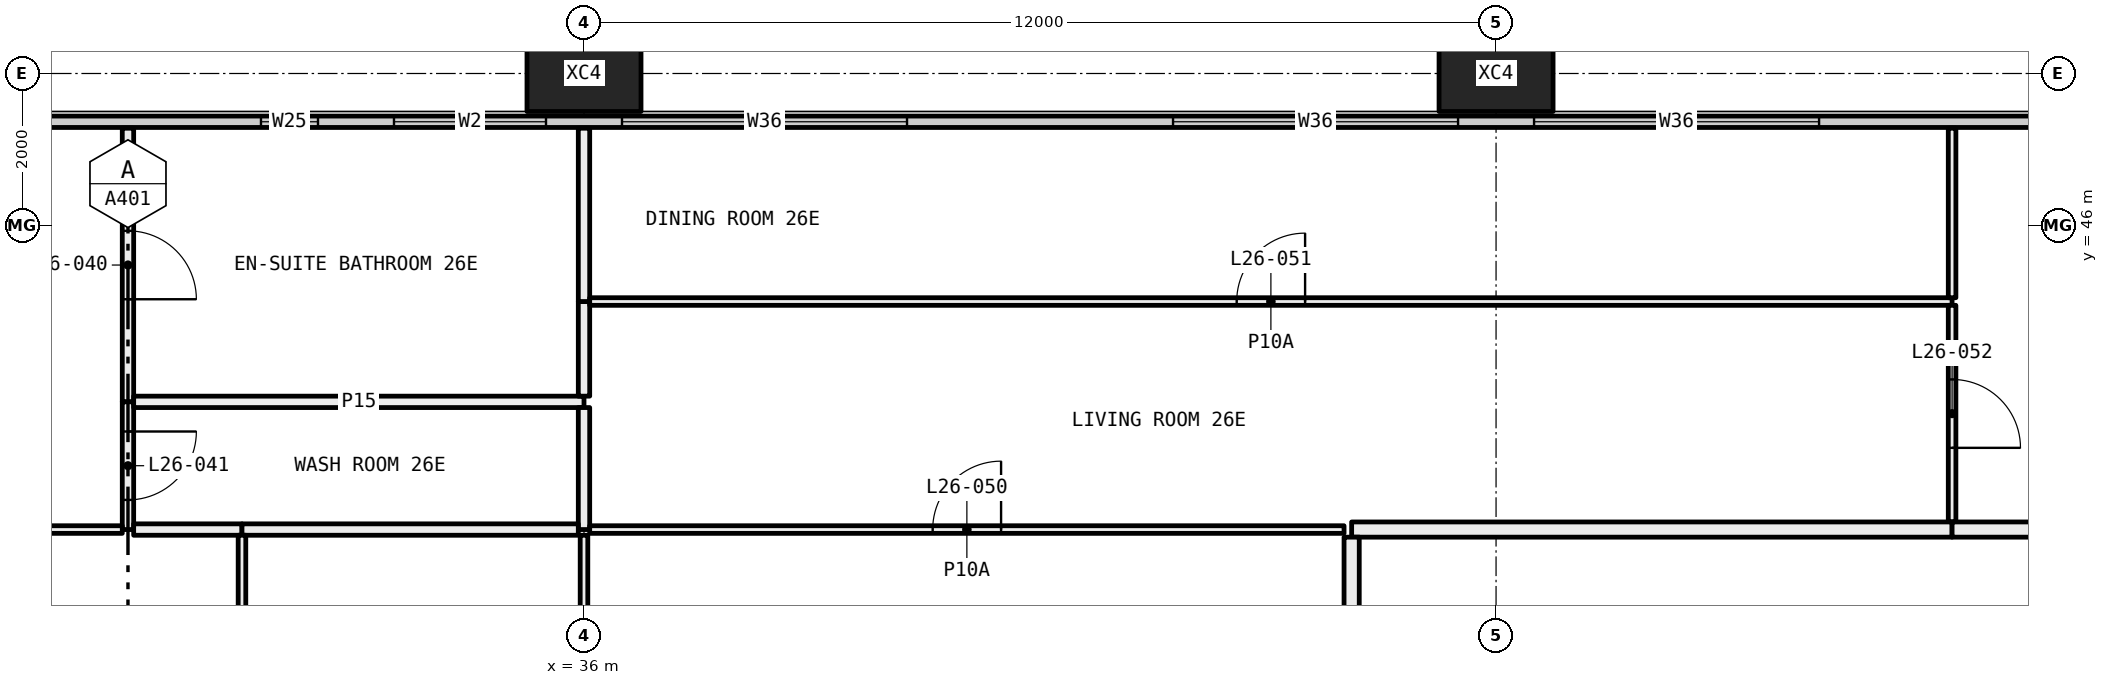
"""IFC4 building model, lengths in metres.
Left out: names, types, materials, properties, quantities, classifications, styles, units other than length and angle.
Written with IfcOpenShell. Run it as: python <this file> out.ifc"""

import sys

from ifc_helpers import new_model, si_unit, direction, frame, frame_2d, origin, origin_2d, place, context, subcontext, project, spatial, rectangle, hollow_rectangle, extrude, element, fill, save


model = new_model("IFC4")
c1 = context("Model", 3, precision=1e-05, world=origin(), true_north=direction((0.0, 1.0)))
c2 = subcontext(c1, "Body", "Model", "MODEL_VIEW")
j1 = project(units=[si_unit("LENGTHUNIT", "METRE"), si_unit("PLANEANGLEUNIT", "RADIAN")], contexts=[c1])
p1 = place(None, origin())
s1 = spatial("IfcSite", under=j1, at=p1, CompositionType="ELEMENT")
p2 = place(p1, origin())
s2 = spatial("IfcBuilding", under=s1, at=p2, CompositionType="ELEMENT")
p3 = place(p2, frame((0.0, 0.0, 103.5)))
s3 = spatial("IfcBuildingStorey", under=s2, at=p3, CompositionType="ELEMENT", Elevation=103.5)
for number, where, z_axis, x_axis in (
    (1, (36.0, 48.0, -0.4), (0.0, 0.0, 1.0), (1.0, 0.0, 0.0)),
    (2, (48.0, 48.0, -0.4), (0.0, 0.0, 1.0), (1.0, 0.0, 0.0)),
):
    element("IfcColumn", number, at=place(p3, frame(where, z_axis=z_axis, x_axis=x_axis)), inside=s3, PredefinedType="COLUMN", context=c2, shape_type="SweptSolid", body=[
        extrude(hollow_rectangle(XDim=1.5, YDim=1.0, WallThickness=0.06, at=origin_2d()), origin(), (0.0, 0.0, 1.0), 3.45),
    ])
p4 = place(p3, frame((6.56, 47.365, 0.0), z_axis=(0.0, 0.0, 1.0), x_axis=(1.0, 0.0, 0.0)))
e3 = element("IfcWall", 3, at=p4, inside=s3, PredefinedType="ELEMENTEDWALL", context=c2, shape_type="SweptSolid", body=[
    extrude(rectangle(XDim=58.88, YDim=0.15, at=frame_2d((29.44, 0.0))), origin(), (0.0, 0.0, 1.0), 3.05),
])
p5 = place(p4, frame((0.44, 0.0, 0.45)))
e4 = element("IfcOpeningElement", 4, at=p5, cuts=e3, PredefinedType="OPENING", context=c2, shape_type="SweptSolid", body=[
    extrude(rectangle(XDim=4.5, YDim=2.55, at=frame_2d((2.25, 1.275))), frame((0.0, 0.085, 0.0), z_axis=(0.0, -1.0, 0.0), x_axis=(1.0, 0.0, 0.0)), (0.0, 0.0, 1.0), 0.17),
])
p6 = place(p4, frame((5.94, 0.0, 0.45)))
e5 = element("IfcOpeningElement", 5, at=p6, cuts=e3, PredefinedType="OPENING", context=c2, shape_type="SweptSolid", body=[
    extrude(rectangle(XDim=3.75, YDim=2.55, at=frame_2d((1.875, 1.275))), frame((0.0, 0.085, 0.0), z_axis=(0.0, -1.0, 0.0), x_axis=(1.0, 0.0, 0.0)), (0.0, 0.0, 1.0), 0.17),
])
p7 = place(p4, frame((13.19, 0.0, 0.45)))
e6 = element("IfcOpeningElement", 6, at=p7, cuts=e3, PredefinedType="OPENING", context=c2, shape_type="SweptSolid", body=[
    extrude(rectangle(XDim=3.75, YDim=2.55, at=frame_2d((1.875, 1.275))), frame((0.0, 0.085, 0.0), z_axis=(0.0, -1.0, 0.0), x_axis=(1.0, 0.0, 0.0)), (0.0, 0.0, 1.0), 0.17),
])
p8 = place(p4, frame((17.94, 0.0, 0.45)))
e7 = element("IfcOpeningElement", 7, at=p8, cuts=e3, PredefinedType="OPENING", context=c2, shape_type="SweptSolid", body=[
    extrude(rectangle(XDim=3.75, YDim=2.55, at=frame_2d((1.875, 1.275))), frame((0.0, 0.085, 0.0), z_axis=(0.0, -1.0, 0.0), x_axis=(1.0, 0.0, 0.0)), (0.0, 0.0, 1.0), 0.17),
])
p9 = place(p4, frame((25.19, 0.0, 0.45)))
e8 = element("IfcOpeningElement", 8, at=p9, cuts=e3, PredefinedType="OPENING", context=c2, shape_type="SweptSolid", body=[
    extrude(rectangle(XDim=0.75, YDim=2.55, at=frame_2d((0.375, 1.275))), frame((0.0, 0.085, 0.0), z_axis=(0.0, -1.0, 0.0), x_axis=(1.0, 0.0, 0.0)), (0.0, 0.0, 1.0), 0.17),
])
p10 = place(p4, frame((26.94, 0.0, 0.45)))
e9 = element("IfcOpeningElement", 9, at=p10, cuts=e3, PredefinedType="OPENING", context=c2, shape_type="SweptSolid", body=[
    extrude(rectangle(XDim=2.0, YDim=2.55, at=frame_2d((1.0, 1.275))), frame((0.0, 0.085, 0.0), z_axis=(0.0, -1.0, 0.0), x_axis=(1.0, 0.0, 0.0)), (0.0, 0.0, 1.0), 0.17),
])
p11 = place(p4, frame((29.94, 0.0, 0.45)))
e10 = element("IfcOpeningElement", 10, at=p11, cuts=e3, PredefinedType="OPENING", context=c2, shape_type="SweptSolid", body=[
    extrude(rectangle(XDim=3.75, YDim=2.55, at=frame_2d((1.875, 1.275))), frame((0.0, 0.085, 0.0), z_axis=(0.0, -1.0, 0.0), x_axis=(1.0, 0.0, 0.0)), (0.0, 0.0, 1.0), 0.17),
])
p12 = place(p4, frame((37.19, 0.0, 0.45)))
e11 = element("IfcOpeningElement", 11, at=p12, cuts=e3, PredefinedType="OPENING", context=c2, shape_type="SweptSolid", body=[
    extrude(rectangle(XDim=3.75, YDim=2.55, at=frame_2d((1.875, 1.275))), frame((0.0, 0.085, 0.0), z_axis=(0.0, -1.0, 0.0), x_axis=(1.0, 0.0, 0.0)), (0.0, 0.0, 1.0), 0.17),
])
p13 = place(p4, frame((41.94, 0.0, 0.45)))
e12 = element("IfcOpeningElement", 12, at=p13, cuts=e3, PredefinedType="OPENING", context=c2, shape_type="SweptSolid", body=[
    extrude(rectangle(XDim=3.75, YDim=2.55, at=frame_2d((1.875, 1.275))), frame((0.0, 0.085, 0.0), z_axis=(0.0, -1.0, 0.0), x_axis=(1.0, 0.0, 0.0)), (0.0, 0.0, 1.0), 0.17),
])
p14 = place(p4, frame((49.19, 0.0, 0.45)))
e13 = element("IfcOpeningElement", 13, at=p14, cuts=e3, PredefinedType="OPENING", context=c2, shape_type="SweptSolid", body=[
    extrude(rectangle(XDim=0.75, YDim=2.55, at=frame_2d((0.375, 1.275))), frame((0.0, 0.085, 0.0), z_axis=(0.0, -1.0, 0.0), x_axis=(1.0, 0.0, 0.0)), (0.0, 0.0, 1.0), 0.17),
])
p15 = place(p4, frame((50.94, 0.0, 0.45)))
e14 = element("IfcOpeningElement", 14, at=p15, cuts=e3, PredefinedType="OPENING", context=c2, shape_type="SweptSolid", body=[
    extrude(rectangle(XDim=2.0, YDim=2.55, at=frame_2d((1.0, 1.275))), frame((0.0, 0.085, 0.0), z_axis=(0.0, -1.0, 0.0), x_axis=(1.0, 0.0, 0.0)), (0.0, 0.0, 1.0), 0.17),
])
p16 = place(p4, frame((53.94, 0.0, 0.45)))
e15 = element("IfcOpeningElement", 15, at=p16, cuts=e3, PredefinedType="OPENING", context=c2, shape_type="SweptSolid", body=[
    extrude(rectangle(XDim=4.5, YDim=2.55, at=frame_2d((2.25, 1.275))), frame((0.0, 0.085, 0.0), z_axis=(0.0, -1.0, 0.0), x_axis=(1.0, 0.0, 0.0)), (0.0, 0.0, 1.0), 0.17),
])
p17 = place(p3, frame((30.0, 43.68, 0.0), z_axis=(0.0, 0.0, 1.0), x_axis=(0.0, 1.0, 0.0)))
e16 = element("IfcWall", 16, at=p17, inside=s3, PredefinedType="PARTITIONING", context=c2, shape_type="SweptSolid", body=[
    extrude(rectangle(XDim=3.6, YDim=0.15, at=frame_2d((1.8, 0.0))), origin(), (0.0, 0.0, 1.0), 3.05),
])
p18 = place(p17, frame((1.35, 0.0, 0.0)))
e17 = element("IfcOpeningElement", 17, at=p18, cuts=e16, PredefinedType="OPENING", context=c2, shape_type="SweptSolid", body=[
    extrude(rectangle(XDim=0.9, YDim=2.1, at=frame_2d((0.45, 1.05))), frame((0.0, 0.085, 0.0), z_axis=(0.0, -1.0, 0.0), x_axis=(1.0, 0.0, 0.0)), (0.0, 0.0, 1.0), 0.17),
])
p19 = place(p3, frame((30.0, 42.0, 0.0), z_axis=(0.0, 0.0, 1.0), x_axis=(0.0, 1.0, 0.0)))
e18 = element("IfcWall", 18, at=p19, inside=s3, PredefinedType="PARTITIONING", context=c2, shape_type="SweptSolid", body=[
    extrude(rectangle(XDim=1.68, YDim=0.15, at=frame_2d((0.84, 0.0))), origin(), (0.0, 0.0, 1.0), 3.05),
])
p20 = place(p19, frame((0.39, 0.0, 0.0)))
e19 = element("IfcOpeningElement", 19, at=p20, cuts=e18, PredefinedType="OPENING", context=c2, shape_type="SweptSolid", body=[
    extrude(rectangle(XDim=0.9, YDim=2.1, at=frame_2d((0.45, 1.05))), frame((0.0, 0.085, 0.0), z_axis=(0.0, -1.0, 0.0), x_axis=(1.0, 0.0, 0.0)), (0.0, 0.0, 1.0), 0.17),
])
p21 = place(p3, frame((26.0, 42.0, 0.0), z_axis=(0.0, 0.0, 1.0), x_axis=(1.0, 0.0, 0.0)))
e20 = element("IfcWall", 20, at=p21, inside=s3, PredefinedType="PARTITIONING", context=c2, shape_type="SweptSolid", body=[
    extrude(rectangle(XDim=3.925, YDim=0.1, at=frame_2d((1.962, 0.0))), origin(), (0.0, 0.0, 1.0), 3.05),
])
p22 = place(p21, frame((1.512, 0.0, 0.0)))
e21 = element("IfcOpeningElement", 21, at=p22, cuts=e20, PredefinedType="OPENING", context=c2, shape_type="SweptSolid", body=[
    extrude(rectangle(XDim=0.9, YDim=2.1, at=frame_2d((0.45, 1.05))), frame((0.0, 0.06, 0.0), z_axis=(0.0, -1.0, 0.0), x_axis=(1.0, 0.0, 0.0)), (0.0, 0.0, 1.0), 0.12),
])
p23 = place(p3, frame((30.075, 43.68, 0.0), z_axis=(0.0, 0.0, 1.0), x_axis=(1.0, 0.0, 0.0)))
e22 = element("IfcWall", 22, at=p23, inside=s3, PredefinedType="PARTITIONING", context=c2, shape_type="SweptSolid", body=[
    extrude(rectangle(XDim=5.925, YDim=0.15, at=frame_2d((2.962, 0.0))), origin(), (0.0, 0.0, 1.0), 2.45),
])
p24 = place(p3, frame((36.0, 43.755, 0.0), z_axis=(0.0, 0.0, 1.0), x_axis=(0.0, 1.0, 0.0)))
e23 = element("IfcWall", 23, at=p24, inside=s3, PredefinedType="PARTITIONING", context=c2, shape_type="SweptSolid", body=[
    extrude(rectangle(XDim=1.245, YDim=0.15, at=frame_2d((0.623, 0.0))), origin(), (0.0, 0.0, 1.0), 2.45),
])
p25 = place(p3, frame((36.0, 45.0, 0.0), z_axis=(0.0, 0.0, 1.0), x_axis=(0.0, 1.0, 0.0)))
e24 = element("IfcWall", 24, at=p25, inside=s3, PredefinedType="PARTITIONING", context=c2, shape_type="SweptSolid", body=[
    extrude(rectangle(XDim=2.28, YDim=0.15, at=frame_2d((1.14, 0.0))), origin(), (0.0, 0.0, 1.0), 2.45),
])
p26 = place(p3, frame((36.0, 42.0, 0.0), z_axis=(0.0, 0.0, 1.0), x_axis=(0.0, 1.0, 0.0)))
e25 = element("IfcWall", 25, at=p26, inside=s3, PredefinedType="PARTITIONING", context=c2, shape_type="SweptSolid", body=[
    extrude(rectangle(XDim=1.605, YDim=0.15, at=frame_2d((0.802, 0.0))), origin(), (0.0, 0.0, 1.0), 2.45),
])
p27 = place(p3, frame((30.075, 42.0, 0.0), z_axis=(0.0, 0.0, 1.0), x_axis=(1.0, 0.0, 0.0)))
e26 = element("IfcWall", 26, at=p27, inside=s3, PredefinedType="PARTITIONING", context=c2, shape_type="SweptSolid", body=[
    extrude(rectangle(XDim=1.425, YDim=0.15, at=frame_2d((0.712, 0.0))), origin(), (0.0, 0.0, 1.0), 3.05),
])
p28 = place(p3, frame((31.5, 42.0, 0.0), z_axis=(0.0, 0.0, 1.0), x_axis=(1.0, 0.0, 0.0)))
e27 = element("IfcWall", 27, at=p28, inside=s3, PredefinedType="PARTITIONING", context=c2, shape_type="SweptSolid", body=[
    extrude(rectangle(XDim=4.425, YDim=0.15, at=frame_2d((2.212, 0.0))), origin(), (0.0, 0.0, 1.0), 2.45),
])
p29 = place(p3, frame((54.0, 45.0, 0.0), z_axis=(0.0, 0.0, 1.0), x_axis=(-1.0, 0.0, 0.0)))
e28 = element("IfcWall", 28, at=p29, inside=s3, PredefinedType="PARTITIONING", context=c2, shape_type="SweptSolid", body=[
    extrude(rectangle(XDim=17.925, YDim=0.1, at=frame_2d((8.962, 0.0))), origin(), (0.0, 0.0, 1.0), 2.45),
])
p30 = place(p29, frame((8.512, 0.0, 0.0)))
e29 = element("IfcOpeningElement", 29, at=p30, cuts=e28, PredefinedType="OPENING", context=c2, shape_type="SweptSolid", body=[
    extrude(rectangle(XDim=0.9, YDim=2.1, at=frame_2d((0.45, 1.05))), frame((0.0, 0.06, 0.0), z_axis=(0.0, -1.0, 0.0), x_axis=(1.0, 0.0, 0.0)), (0.0, 0.0, 1.0), 0.12),
])
p31 = place(p3, frame((54.0, 42.1, 0.0), z_axis=(0.0, 0.0, 1.0), x_axis=(0.0, 1.0, 0.0)))
e30 = element("IfcWall", 30, at=p31, inside=s3, PredefinedType="PARTITIONING", context=c2, shape_type="SweptSolid", body=[
    extrude(rectangle(XDim=2.85, YDim=0.1, at=frame_2d((1.425, 0.0))), origin(), (0.0, 0.0, 1.0), 3.05),
])
p32 = place(p31, frame((0.975, 0.0, 0.0)))
e31 = element("IfcOpeningElement", 31, at=p32, cuts=e30, PredefinedType="OPENING", context=c2, shape_type="SweptSolid", body=[
    extrude(rectangle(XDim=0.9, YDim=2.1, at=frame_2d((0.45, 1.05))), frame((0.0, 0.06, 0.0), z_axis=(0.0, -1.0, 0.0), x_axis=(1.0, 0.0, 0.0)), (0.0, 0.0, 1.0), 0.12),
])
p33 = place(p3, frame((36.075, 42.0, 0.0), z_axis=(0.0, 0.0, 1.0), x_axis=(1.0, 0.0, 0.0)))
e32 = element("IfcWall", 32, at=p33, inside=s3, PredefinedType="PARTITIONING", context=c2, shape_type="SweptSolid", body=[
    extrude(rectangle(XDim=9.925, YDim=0.1, at=frame_2d((4.962, 0.0))), origin(), (0.0, 0.0, 1.0), 2.45),
])
p34 = place(p33, frame((4.512, 0.0, 0.0)))
e33 = element("IfcOpeningElement", 33, at=p34, cuts=e32, PredefinedType="OPENING", context=c2, shape_type="SweptSolid", body=[
    extrude(rectangle(XDim=0.9, YDim=2.1, at=frame_2d((0.45, 1.05))), frame((0.0, 0.06, 0.0), z_axis=(0.0, -1.0, 0.0), x_axis=(1.0, 0.0, 0.0)), (0.0, 0.0, 1.0), 0.12),
])
p35 = place(p3, frame((46.1, 42.0, 0.0), z_axis=(0.0, 0.0, 1.0), x_axis=(1.0, 0.0, 0.0)))
e34 = element("IfcWall", 34, at=p35, inside=s3, PredefinedType="PARTITIONING", context=c2, shape_type="SweptSolid", body=[
    extrude(rectangle(XDim=7.9, YDim=0.2, at=frame_2d((3.95, 0.0))), origin(), (0.0, 0.0, 1.0), 3.05),
])
p36 = place(p3, frame((54.0, 45.05, 0.0), z_axis=(0.0, 0.0, 1.0), x_axis=(0.0, 1.0, 0.0)))
e35 = element("IfcWall", 35, at=p36, inside=s3, PredefinedType="PARTITIONING", context=c2, shape_type="SweptSolid", body=[
    extrude(rectangle(XDim=2.23, YDim=0.1, at=frame_2d((1.115, 0.0))), origin(), (0.0, 0.0, 1.0), 3.05),
])
p37 = place(p3, frame((54.0, 42.0, 0.0), z_axis=(0.0, 0.0, 1.0), x_axis=(1.0, 0.0, 0.0)))
e36 = element("IfcWall", 36, at=p37, inside=s3, PredefinedType="PARTITIONING", context=c2, shape_type="SweptSolid", body=[
    extrude(rectangle(XDim=6.0, YDim=0.2, at=frame_2d((3.0, 0.0))), origin(), (0.0, 0.0, 1.0), 3.05),
])
p38 = place(p3, frame((31.5, 36.1, 0.0), z_axis=(0.0, 0.0, 1.0), x_axis=(0.0, 1.0, 0.0)))
e37 = element("IfcWall", 37, at=p38, inside=s3, PredefinedType="PARTITIONING", context=c2, shape_type="SweptSolid", body=[
    extrude(rectangle(XDim=5.825, YDim=0.1, at=frame_2d((2.913, 0.0))), origin(), (0.0, 0.0, 1.0), 3.05),
])
p39 = place(p38, frame((2.462, 0.0, 0.0)))
e38 = element("IfcOpeningElement", 38, at=p39, cuts=e37, PredefinedType="OPENING", context=c2, shape_type="SweptSolid", body=[
    extrude(rectangle(XDim=0.9, YDim=2.1, at=frame_2d((0.45, 1.05))), frame((0.0, 0.06, 0.0), z_axis=(0.0, -1.0, 0.0), x_axis=(1.0, 0.0, 0.0)), (0.0, 0.0, 1.0), 0.12),
])
p40 = place(p3, frame((36.0, 36.75, 0.0), z_axis=(0.0, 0.0, 1.0), x_axis=(0.0, 1.0, 0.0)))
e39 = element("IfcWall", 39, at=p40, inside=s3, PredefinedType="PARTITIONING", context=c2, shape_type="SweptSolid", body=[
    extrude(rectangle(XDim=5.175, YDim=0.1, at=frame_2d((2.587, 0.0))), origin(), (0.0, 0.0, 1.0), 2.45),
])
p41 = place(p40, frame((2.137, 0.0, 0.0)))
e40 = element("IfcOpeningElement", 40, at=p41, cuts=e39, PredefinedType="OPENING", context=c2, shape_type="SweptSolid", body=[
    extrude(rectangle(XDim=0.9, YDim=2.1, at=frame_2d((0.45, 1.05))), frame((0.0, 0.06, 0.0), z_axis=(0.0, -1.0, 0.0), x_axis=(1.0, 0.0, 0.0)), (0.0, 0.0, 1.0), 0.12),
])
p42 = place(p3, frame((46.1, 36.1, 0.0), z_axis=(0.0, 0.0, 1.0), x_axis=(0.0, 1.0, 0.0)))
e41 = element("IfcWall", 41, at=p42, inside=s3, PredefinedType="PARTITIONING", context=c2, shape_type="SweptSolid", body=[
    extrude(rectangle(XDim=5.8, YDim=0.2, at=frame_2d((2.9, 0.0))), origin(), (0.0, 0.0, 1.0), 3.05),
])
p43 = place(p9, origin())
e42 = element("IfcWindow", 42, at=p43, inside=s3, PartitioningType="SINGLE_PANEL", PredefinedType="WINDOW", context=c2, shape_type="SweptSolid", body=[
    extrude(rectangle(XDim=0.75, YDim=2.55, at=frame_2d((0.375, 1.275))), frame((0.0, 0.03, 0.0), z_axis=(0.0, -1.0, 0.0), x_axis=(1.0, 0.0, 0.0)), (0.0, 0.0, 1.0), 0.06),
])
fill(e8, e42)
p44 = place(p10, origin())
e43 = element("IfcWindow", 43, at=p44, inside=s3, PartitioningType="SINGLE_PANEL", PredefinedType="WINDOW", context=c2, shape_type="SweptSolid", body=[
    extrude(rectangle(XDim=2.0, YDim=2.55, at=frame_2d((1.0, 1.275))), frame((0.0, 0.03, 0.0), z_axis=(0.0, -1.0, 0.0), x_axis=(1.0, 0.0, 0.0)), (0.0, 0.0, 1.0), 0.06),
])
fill(e9, e43)
p45 = place(p11, origin())
e44 = element("IfcWindow", 44, at=p45, inside=s3, PartitioningType="SINGLE_PANEL", PredefinedType="WINDOW", context=c2, shape_type="SweptSolid", body=[
    extrude(rectangle(XDim=3.75, YDim=2.55, at=frame_2d((1.875, 1.275))), frame((0.0, 0.03, 0.0), z_axis=(0.0, -1.0, 0.0), x_axis=(1.0, 0.0, 0.0)), (0.0, 0.0, 1.0), 0.06),
])
fill(e10, e44)
p46 = place(p12, origin())
e45 = element("IfcWindow", 45, at=p46, inside=s3, PartitioningType="SINGLE_PANEL", PredefinedType="WINDOW", context=c2, shape_type="SweptSolid", body=[
    extrude(rectangle(XDim=3.75, YDim=2.55, at=frame_2d((1.875, 1.275))), frame((0.0, 0.03, 0.0), z_axis=(0.0, -1.0, 0.0), x_axis=(1.0, 0.0, 0.0)), (0.0, 0.0, 1.0), 0.06),
])
fill(e11, e45)
p47 = place(p13, origin())
e46 = element("IfcWindow", 46, at=p47, inside=s3, PartitioningType="SINGLE_PANEL", PredefinedType="WINDOW", context=c2, shape_type="SweptSolid", body=[
    extrude(rectangle(XDim=3.75, YDim=2.55, at=frame_2d((1.875, 1.275))), frame((0.0, 0.03, 0.0), z_axis=(0.0, -1.0, 0.0), x_axis=(1.0, 0.0, 0.0)), (0.0, 0.0, 1.0), 0.06),
])
fill(e12, e46)
p48 = place(p18, frame((0.9, 0.0, 0.0), x_axis=(-1.0, 0.0, 0.0)))
e47 = element("IfcDoor", 47, at=p48, inside=s3, OperationType="SINGLE_SWING_LEFT", PredefinedType="DOOR", context=c2, shape_type="SweptSolid", body=[
    extrude(rectangle(XDim=0.9, YDim=2.1, at=frame_2d((0.45, 1.05))), frame((0.0, 0.025, 0.0), z_axis=(0.0, -1.0, 0.0), x_axis=(1.0, 0.0, 0.0)), (0.0, 0.0, 1.0), 0.05),
])
fill(e17, e47)
p49 = place(p20, frame((0.9, 0.0, 0.0), x_axis=(-1.0, 0.0, 0.0)))
e48 = element("IfcDoor", 48, at=p49, inside=s3, OperationType="SINGLE_SWING_RIGHT", PredefinedType="DOOR", context=c2, shape_type="SweptSolid", body=[
    extrude(rectangle(XDim=0.9, YDim=2.1, at=frame_2d((0.45, 1.05))), frame((0.0, 0.025, 0.0), z_axis=(0.0, -1.0, 0.0), x_axis=(1.0, 0.0, 0.0)), (0.0, 0.0, 1.0), 0.05),
])
fill(e19, e48)
p50 = place(p34, origin())
e49 = element("IfcDoor", 49, at=p50, inside=s3, OperationType="SINGLE_SWING_LEFT", PredefinedType="DOOR", context=c2, shape_type="SweptSolid", body=[
    extrude(rectangle(XDim=0.9, YDim=2.1, at=frame_2d((0.45, 1.05))), frame((0.0, 0.025, 0.0), z_axis=(0.0, -1.0, 0.0), x_axis=(1.0, 0.0, 0.0)), (0.0, 0.0, 1.0), 0.05),
])
fill(e33, e49)
p51 = place(p30, frame((0.9, 0.0, 0.0), x_axis=(-1.0, 0.0, 0.0)))
e50 = element("IfcDoor", 50, at=p51, inside=s3, OperationType="SINGLE_SWING_LEFT", PredefinedType="DOOR", context=c2, shape_type="SweptSolid", body=[
    extrude(rectangle(XDim=0.9, YDim=2.1, at=frame_2d((0.45, 1.05))), frame((0.0, 0.025, 0.0), z_axis=(0.0, -1.0, 0.0), x_axis=(1.0, 0.0, 0.0)), (0.0, 0.0, 1.0), 0.05),
])
fill(e29, e50)
p52 = place(p32, frame((0.9, 0.0, 0.0), x_axis=(-1.0, 0.0, 0.0)))
e51 = element("IfcDoor", 51, at=p52, inside=s3, OperationType="SINGLE_SWING_LEFT", PredefinedType="DOOR", context=c2, shape_type="SweptSolid", body=[
    extrude(rectangle(XDim=0.9, YDim=2.1, at=frame_2d((0.45, 1.05))), frame((0.0, 0.025, 0.0), z_axis=(0.0, -1.0, 0.0), x_axis=(1.0, 0.0, 0.0)), (0.0, 0.0, 1.0), 0.05),
])
fill(e31, e51)
save(model, sys.argv[1])
